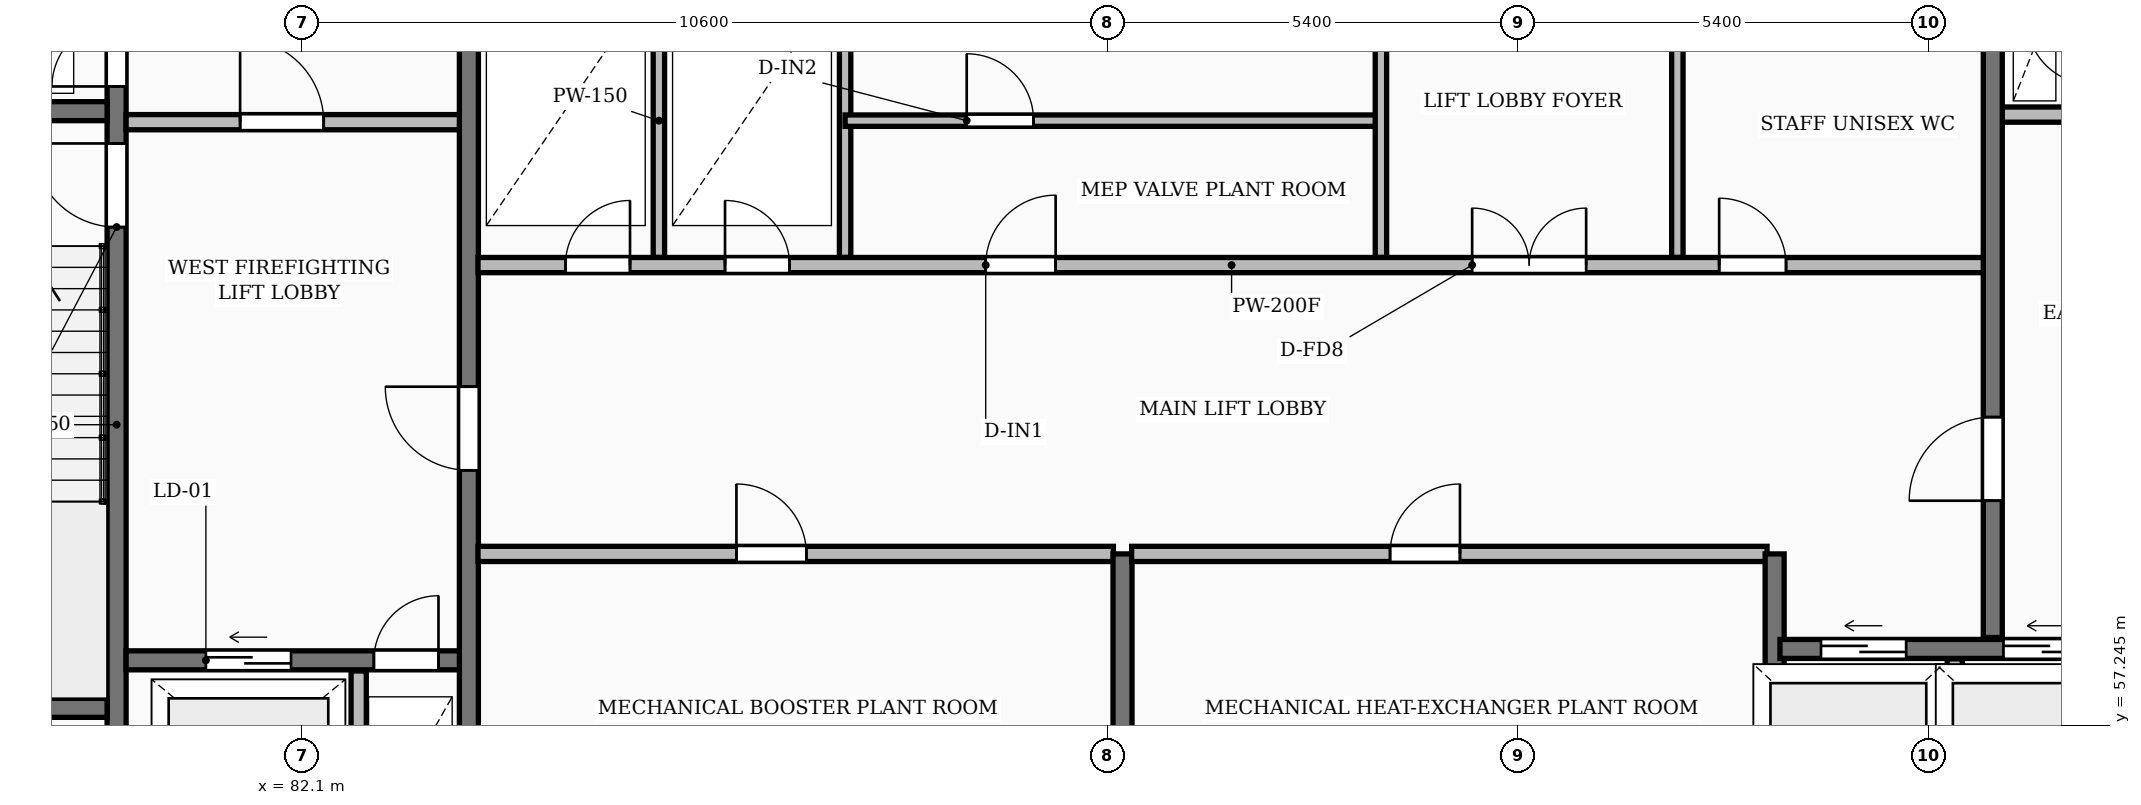
"""IFC4 building model, lengths in metres.
Left out: names, types, materials, properties, quantities, classifications, styles, units other than length and angle.
Written with IfcOpenShell. Run it as: python <this file> out.ifc"""

import sys

from ifc_helpers import new_model, si_unit, direction, frame, frame_2d, origin, place, context, subcontext, project, spatial, rectangle, extrude, element, fill, save


model = new_model("IFC4")
c1 = context("Model", 3, precision=1e-05, world=origin(), true_north=direction((0.0, 1.0)))
c2 = subcontext(c1, "Body", "Model", "MODEL_VIEW")
j1 = project(units=[si_unit("LENGTHUNIT", "METRE"), si_unit("PLANEANGLEUNIT", "RADIAN")], contexts=[c1])
p1 = place(None, origin())
s1 = spatial("IfcSite", under=j1, at=p1, CompositionType="ELEMENT")
p2 = place(p1, origin())
s2 = spatial("IfcBuilding", under=s1, at=p2, CompositionType="ELEMENT")
p3 = place(p2, frame((0.0, 0.0, 223.85)))
s3 = spatial("IfcBuildingStorey", under=s2, at=p3, CompositionType="ELEMENT", Elevation=223.85)
p4 = place(p3, frame((79.665, 55.4, 0.0), z_axis=(0.0, 0.0, 1.0), x_axis=(0.0, 1.0, 0.0)))
e1 = element("IfcWall", 1, at=p4, inside=s3, PredefinedType="SHEAR", context=c2, shape_type="SweptSolid", body=[
    extrude(rectangle(XDim=11.6, YDim=0.25, at=frame_2d((5.8, 0.0))), origin(), (0.0, 0.0, 1.0), 4.8),
])
p5 = place(p4, frame((0.55, 0.0, 0.0)))
e2 = element("IfcOpeningElement", 2, at=p5, cuts=e1, PredefinedType="OPENING", context=c2, shape_type="SweptSolid", body=[
    extrude(rectangle(XDim=0.85, YDim=2.05, at=frame_2d((0.425, 1.025))), frame((0.0, 0.135, 0.0), z_axis=(0.0, -1.0, 0.0), x_axis=(1.0, 0.0, 0.0)), (0.0, 0.0, 1.0), 0.27),
])
p6 = place(p4, frame((8.4, 0.0, 0.0)))
e3 = element("IfcOpeningElement", 3, at=p6, cuts=e1, PredefinedType="OPENING", context=c2, shape_type="SweptSolid", body=[
    extrude(rectangle(XDim=1.1, YDim=2.1, at=frame_2d((0.55, 1.05))), frame((0.0, 0.135, 0.0), z_axis=(0.0, -1.0, 0.0), x_axis=(1.0, 0.0, 0.0)), (0.0, 0.0, 1.0), 0.27),
])
p7 = place(p4, frame((10.25, 0.0, 0.0)))
e4 = element("IfcOpeningElement", 4, at=p7, cuts=e1, PredefinedType="OPENING", context=c2, shape_type="SweptSolid", body=[
    extrude(rectangle(XDim=0.85, YDim=2.05, at=frame_2d((0.425, 1.025))), frame((0.0, 0.135, 0.0), z_axis=(0.0, -1.0, 0.0), x_axis=(1.0, 0.0, 0.0)), (0.0, 0.0, 1.0), 0.27),
])
for number, where, z_axis, x_axis in (
    (5, (76.3, 57.475, 0.0), (0.0, 0.0, 1.0), (1.0, 0.0, 0.0)),
    (6, (76.3, 65.325, 0.0), (0.0, 0.0, 1.0), (1.0, 0.0, 0.0)),
):
    element("IfcWall", number, at=place(p3, frame(where, z_axis=z_axis, x_axis=x_axis)), inside=s3, PredefinedType="SHEAR", context=c2, shape_type="SweptSolid", body=[
        extrude(rectangle(XDim=3.24, YDim=0.25, at=frame_2d((1.62, 0.0))), origin(), (0.0, 0.0, 1.0), 4.8),
    ])
p8 = place(p3, frame((79.79, 58.1, 0.0), z_axis=(0.0, 0.0, 1.0), x_axis=(1.0, 0.0, 0.0)))
e7 = element("IfcWall", 7, at=p8, inside=s3, PredefinedType="SHEAR", context=c2, shape_type="SweptSolid", body=[
    extrude(rectangle(XDim=4.39, YDim=0.25, at=frame_2d((2.195, 0.0))), origin(), (0.0, 0.0, 1.0), 4.8),
])
p9 = place(p8, frame((1.05, 0.0, 0.0)))
e8 = element("IfcOpeningElement", 8, at=p9, cuts=e7, PredefinedType="OPENING", context=c2, shape_type="SweptSolid", body=[
    extrude(rectangle(XDim=1.12, YDim=2.12, at=frame_2d((0.56, 1.06))), frame((0.0, 0.135, 0.0), z_axis=(0.0, -1.0, 0.0), x_axis=(1.0, 0.0, 0.0)), (0.0, 0.0, 1.0), 0.27),
])
p10 = place(p8, frame((3.26, 0.0, 0.0)))
e9 = element("IfcOpeningElement", 9, at=p10, cuts=e7, PredefinedType="OPENING", context=c2, shape_type="SweptSolid", body=[
    extrude(rectangle(XDim=0.85, YDim=2.05, at=frame_2d((0.425, 1.025))), frame((0.0, 0.135, 0.0), z_axis=(0.0, -1.0, 0.0), x_axis=(1.0, 0.0, 0.0)), (0.0, 0.0, 1.0), 0.27),
])
p11 = place(p3, frame((82.85, 55.4, 0.0), z_axis=(0.0, 0.0, 1.0), x_axis=(0.0, 1.0, 0.0)))
e10 = element("IfcWall", 10, at=p11, inside=s3, PredefinedType="PARTITIONING", context=c2, shape_type="SweptSolid", body=[
    extrude(rectangle(XDim=2.56, YDim=0.2, at=frame_2d((1.28, 0.0))), origin(), (0.0, 0.0, 1.0), 4.48),
])
p12 = place(p3, frame((79.79, 65.18, 0.0), z_axis=(0.0, 0.0, 1.0), x_axis=(1.0, 0.0, 0.0)))
e11 = element("IfcWall", 11, at=p12, inside=s3, PredefinedType="PARTITIONING", context=c2, shape_type="SweptSolid", body=[
    extrude(rectangle(XDim=4.39, YDim=0.2, at=frame_2d((2.195, 0.0))), origin(), (0.0, 0.0, 1.0), 4.48),
])
p13 = place(p12, frame((1.5, 0.0, 0.0)))
e12 = element("IfcOpeningElement", 12, at=p13, cuts=e11, PredefinedType="OPENING", context=c2, shape_type="SweptSolid", body=[
    extrude(rectangle(XDim=1.1, YDim=2.1, at=frame_2d((0.55, 1.05))), frame((0.0, 0.11, 0.0), z_axis=(0.0, -1.0, 0.0), x_axis=(1.0, 0.0, 0.0)), (0.0, 0.0, 1.0), 0.22),
])
p14 = place(p3, frame((84.3, 55.4, 0.0), z_axis=(0.0, 0.0, 1.0), x_axis=(0.0, 1.0, 0.0)))
e13 = element("IfcWall", 13, at=p14, inside=s3, PredefinedType="SHEAR", context=c2, shape_type="SweptSolid", body=[
    extrude(rectangle(XDim=11.6, YDim=0.25, at=frame_2d((5.8, 0.0))), origin(), (0.0, 0.0, 1.0), 4.8),
])
p15 = place(p14, frame((5.2, 0.0, 0.0)))
e14 = element("IfcOpeningElement", 14, at=p15, cuts=e13, PredefinedType="OPENING", context=c2, shape_type="SweptSolid", body=[
    extrude(rectangle(XDim=1.1, YDim=2.1, at=frame_2d((0.55, 1.05))), frame((0.0, 0.135, 0.0), z_axis=(0.0, -1.0, 0.0), x_axis=(1.0, 0.0, 0.0)), (0.0, 0.0, 1.0), 0.27),
])
p16 = place(p3, frame((84.42, 59.5, 0.0), z_axis=(0.0, 0.0, 1.0), x_axis=(1.0, 0.0, 0.0)))
e15 = element("IfcWall", 15, at=p16, inside=s3, PredefinedType="PARTITIONING", context=c2, shape_type="SweptSolid", body=[
    extrude(rectangle(XDim=8.36, YDim=0.2, at=frame_2d((4.18, 0.0))), origin(), (0.0, 0.0, 1.0), 4.48),
])
p17 = place(p16, frame((3.4, 0.0, 0.0)))
e16 = element("IfcOpeningElement", 16, at=p17, cuts=e15, PredefinedType="OPENING", context=c2, shape_type="SweptSolid", body=[
    extrude(rectangle(XDim=0.92, YDim=2.08, at=frame_2d((0.46, 1.04))), frame((0.0, 0.11, 0.0), z_axis=(0.0, -1.0, 0.0), x_axis=(1.0, 0.0, 0.0)), (0.0, 0.0, 1.0), 0.22),
])
p18 = place(p3, frame((92.9, 55.4, 0.0), z_axis=(0.0, 0.0, 1.0), x_axis=(0.0, 1.0, 0.0)))
e17 = element("IfcWall", 17, at=p18, inside=s3, PredefinedType="SHEAR", context=c2, shape_type="SweptSolid", body=[
    extrude(rectangle(XDim=4.1, YDim=0.25, at=frame_2d((2.05, 0.0))), origin(), (0.0, 0.0, 1.0), 4.8),
])
p19 = place(p3, frame((93.02, 59.5, 0.0), z_axis=(0.0, 0.0, 1.0), x_axis=(1.0, 0.0, 0.0)))
e18 = element("IfcWall", 18, at=p19, inside=s3, PredefinedType="PARTITIONING", context=c2, shape_type="SweptSolid", body=[
    extrude(rectangle(XDim=8.36, YDim=0.2, at=frame_2d((4.18, 0.0))), origin(), (0.0, 0.0, 1.0), 4.48),
])
p20 = place(p19, frame((3.4, 0.0, 0.0)))
e19 = element("IfcOpeningElement", 19, at=p20, cuts=e18, PredefinedType="OPENING", context=c2, shape_type="SweptSolid", body=[
    extrude(rectangle(XDim=0.92, YDim=2.08, at=frame_2d((0.46, 1.04))), frame((0.0, 0.11, 0.0), z_axis=(0.0, -1.0, 0.0), x_axis=(1.0, 0.0, 0.0)), (0.0, 0.0, 1.0), 0.22),
])
p21 = place(p3, frame((101.48, 55.4, 0.0), z_axis=(0.0, 0.0, 1.0), x_axis=(0.0, 1.0, 0.0)))
e20 = element("IfcWall", 20, at=p21, inside=s3, PredefinedType="SHEAR", context=c2, shape_type="SweptSolid", body=[
    extrude(rectangle(XDim=4.1, YDim=0.25, at=frame_2d((2.05, 0.0))), origin(), (0.0, 0.0, 1.0), 4.8),
])
p22 = place(p3, frame((103.85, 55.4, 0.0), z_axis=(0.0, 0.0, 1.0), x_axis=(0.0, 1.0, 0.0)))
e21 = element("IfcWall", 21, at=p22, inside=s3, PredefinedType="PARTITIONING", context=c2, shape_type="SweptSolid", body=[
    extrude(rectangle(XDim=2.72, YDim=0.2, at=frame_2d((1.36, 0.0))), origin(), (0.0, 0.0, 1.0), 4.48),
])
p23 = place(p3, frame((101.55, 58.25, 0.0), z_axis=(0.0, 0.0, 1.0), x_axis=(1.0, 0.0, 0.0)))
e22 = element("IfcWall", 22, at=p23, inside=s3, PredefinedType="SHEAR", context=c2, shape_type="SweptSolid", body=[
    extrude(rectangle(XDim=4.6, YDim=0.25, at=frame_2d((2.3, 0.0))), origin(), (0.0, 0.0, 1.0), 4.8),
])
p24 = place(p23, frame((0.54, 0.0, 0.0)))
e23 = element("IfcOpeningElement", 23, at=p24, cuts=e22, PredefinedType="OPENING", context=c2, shape_type="SweptSolid", body=[
    extrude(rectangle(XDim=1.12, YDim=2.12, at=frame_2d((0.56, 1.06))), frame((0.0, 0.135, 0.0), z_axis=(0.0, -1.0, 0.0), x_axis=(1.0, 0.0, 0.0)), (0.0, 0.0, 1.0), 0.27),
])
p25 = place(p23, frame((2.94, 0.0, 0.0)))
e24 = element("IfcOpeningElement", 24, at=p25, cuts=e22, PredefinedType="OPENING", context=c2, shape_type="SweptSolid", body=[
    extrude(rectangle(XDim=1.12, YDim=2.12, at=frame_2d((0.56, 1.06))), frame((0.0, 0.135, 0.0), z_axis=(0.0, -1.0, 0.0), x_axis=(1.0, 0.0, 0.0)), (0.0, 0.0, 1.0), 0.27),
])
for number, where, z_axis, x_axis in (
    (25, (86.8, 63.4, 0.0), (0.0, 0.0, 1.0), (0.0, 1.0, 0.0)),
    (26, (89.25, 63.4, 0.0), (0.0, 0.0, 1.0), (0.0, 1.0, 0.0)),
):
    element("IfcWall", number, at=place(p3, frame(where, z_axis=z_axis, x_axis=x_axis)), inside=s3, PredefinedType="PARTITIONING", context=c2, shape_type="SweptSolid", body=[
        extrude(rectangle(XDim=3.6, YDim=0.15, at=frame_2d((1.8, 0.0))), origin(), (0.0, 0.0, 1.0), 4.48),
    ])
p26 = place(p3, frame((89.25, 65.2, 0.0), z_axis=(0.0, 0.0, 1.0), x_axis=(1.0, 0.0, 0.0)))
e27 = element("IfcWall", 27, at=p26, inside=s3, PredefinedType="PARTITIONING", context=c2, shape_type="SweptSolid", body=[
    extrude(rectangle(XDim=7.05, YDim=0.15, at=frame_2d((3.525, 0.0))), origin(), (0.0, 0.0, 1.0), 4.48),
])
p27 = place(p26, frame((1.6, 0.0, 0.0)))
e28 = element("IfcOpeningElement", 28, at=p27, cuts=e27, PredefinedType="OPENING", context=c2, shape_type="SweptSolid", body=[
    extrude(rectangle(XDim=0.88, YDim=2.06, at=frame_2d((0.44, 1.03))), frame((0.0, 0.085, 0.0), z_axis=(0.0, -1.0, 0.0), x_axis=(1.0, 0.0, 0.0)), (0.0, 0.0, 1.0), 0.17),
])
for number, where, z_axis, x_axis in (
    (29, (96.3, 63.4, 0.0), (0.0, 0.0, 1.0), (0.0, 1.0, 0.0)),
    (30, (100.2, 63.4, 0.0), (0.0, 0.0, 1.0), (0.0, 1.0, 0.0)),
):
    element("IfcWall", number, at=place(p3, frame(where, z_axis=z_axis, x_axis=x_axis)), inside=s3, PredefinedType="PARTITIONING", context=c2, shape_type="SweptSolid", body=[
        extrude(rectangle(XDim=3.6, YDim=0.15, at=frame_2d((1.8, 0.0))), origin(), (0.0, 0.0, 1.0), 4.48),
    ])
p28 = place(p3, frame((84.42, 63.3, 0.0), z_axis=(0.0, 0.0, 1.0), x_axis=(1.0, 0.0, 0.0)))
e31 = element("IfcWall", 31, at=p28, inside=s3, PredefinedType="PARTITIONING", context=c2, shape_type="SweptSolid", body=[
    extrude(rectangle(XDim=19.83, YDim=0.2, at=frame_2d((9.915, 0.0))), origin(), (0.0, 0.0, 1.0), 4.48),
])
p29 = place(p28, frame((1.15, 0.0, 0.0)))
e32 = element("IfcOpeningElement", 32, at=p29, cuts=e31, PredefinedType="OPENING", context=c2, shape_type="SweptSolid", body=[
    extrude(rectangle(XDim=0.85, YDim=2.05, at=frame_2d((0.425, 1.025))), frame((0.0, 0.11, 0.0), z_axis=(0.0, -1.0, 0.0), x_axis=(1.0, 0.0, 0.0)), (0.0, 0.0, 1.0), 0.22),
])
p30 = place(p28, frame((3.25, 0.0, 0.0)))
e33 = element("IfcOpeningElement", 33, at=p30, cuts=e31, PredefinedType="OPENING", context=c2, shape_type="SweptSolid", body=[
    extrude(rectangle(XDim=0.85, YDim=2.05, at=frame_2d((0.425, 1.025))), frame((0.0, 0.11, 0.0), z_axis=(0.0, -1.0, 0.0), x_axis=(1.0, 0.0, 0.0)), (0.0, 0.0, 1.0), 0.22),
])
p31 = place(p28, frame((13.08, 0.0, 0.0)))
e34 = element("IfcOpeningElement", 34, at=p31, cuts=e31, PredefinedType="OPENING", context=c2, shape_type="SweptSolid", body=[
    extrude(rectangle(XDim=1.5, YDim=2.2, at=frame_2d((0.75, 1.1))), frame((0.0, 0.11, 0.0), z_axis=(0.0, -1.0, 0.0), x_axis=(1.0, 0.0, 0.0)), (0.0, 0.0, 1.0), 0.22),
])
p32 = place(p28, frame((6.68, 0.0, 0.0)))
e35 = element("IfcOpeningElement", 35, at=p32, cuts=e31, PredefinedType="OPENING", context=c2, shape_type="SweptSolid", body=[
    extrude(rectangle(XDim=0.92, YDim=2.08, at=frame_2d((0.46, 1.04))), frame((0.0, 0.11, 0.0), z_axis=(0.0, -1.0, 0.0), x_axis=(1.0, 0.0, 0.0)), (0.0, 0.0, 1.0), 0.22),
])
p33 = place(p28, frame((16.33, 0.0, 0.0)))
e36 = element("IfcOpeningElement", 36, at=p33, cuts=e31, PredefinedType="OPENING", context=c2, shape_type="SweptSolid", body=[
    extrude(rectangle(XDim=0.88, YDim=2.06, at=frame_2d((0.44, 1.03))), frame((0.0, 0.11, 0.0), z_axis=(0.0, -1.0, 0.0), x_axis=(1.0, 0.0, 0.0)), (0.0, 0.0, 1.0), 0.22),
])
p34 = place(p3, frame((104.45, 65.28, 0.0), z_axis=(0.0, 0.0, 1.0), x_axis=(1.0, 0.0, 0.0)))
e37 = element("IfcWall", 37, at=p34, inside=s3, PredefinedType="PARTITIONING", context=c2, shape_type="SweptSolid", body=[
    extrude(rectangle(XDim=1.2, YDim=0.2, at=frame_2d((0.6, 0.0))), origin(), (0.0, 0.0, 1.0), 4.48),
])
p35 = place(p3, frame((104.35, 58.4, 0.0), z_axis=(0.0, 0.0, 1.0), x_axis=(0.0, 1.0, 0.0)))
e38 = element("IfcWall", 38, at=p35, inside=s3, PredefinedType="SHEAR", context=c2, shape_type="SweptSolid", body=[
    extrude(rectangle(XDim=8.6, YDim=0.25, at=frame_2d((4.3, 0.0))), origin(), (0.0, 0.0, 1.0), 4.8),
])
p36 = place(p35, frame((1.8, 0.0, 0.0)))
e39 = element("IfcOpeningElement", 39, at=p36, cuts=e38, PredefinedType="OPENING", context=c2, shape_type="SweptSolid", body=[
    extrude(rectangle(XDim=1.1, YDim=2.1, at=frame_2d((0.55, 1.05))), frame((0.0, 0.135, 0.0), z_axis=(0.0, -1.0, 0.0), x_axis=(1.0, 0.0, 0.0)), (0.0, 0.0, 1.0), 0.27),
])
p37 = place(p6, origin())
e40 = element("IfcDoor", 40, at=p37, inside=s3, OperationType="SINGLE_SWING_RIGHT", PredefinedType="DOOR", context=c2, shape_type="SweptSolid", body=[
    extrude(rectangle(XDim=1.1, YDim=2.1, at=frame_2d((0.55, 1.05))), frame((0.0, 0.025, 0.0), z_axis=(0.0, -1.0, 0.0), x_axis=(1.0, 0.0, 0.0)), (0.0, 0.0, 1.0), 0.05),
])
fill(e3, e40)
p38 = place(p7, origin())
e41 = element("IfcDoor", 41, at=p38, inside=s3, OperationType="SINGLE_SWING_LEFT", PredefinedType="DOOR", context=c2, shape_type="SweptSolid", body=[
    extrude(rectangle(XDim=0.85, YDim=2.05, at=frame_2d((0.425, 1.025))), frame((0.0, 0.025, 0.0), z_axis=(0.0, -1.0, 0.0), x_axis=(1.0, 0.0, 0.0)), (0.0, 0.0, 1.0), 0.05),
])
fill(e4, e41)
p39 = place(p9, origin())
e42 = element("IfcDoor", 42, at=p39, inside=s3, OperationType="SLIDING_TO_LEFT", PredefinedType="DOOR", context=c2, shape_type="SweptSolid", body=[
    extrude(rectangle(XDim=1.12, YDim=2.12, at=frame_2d((0.56, 1.06))), frame((0.0, 0.025, 0.0), z_axis=(0.0, -1.0, 0.0), x_axis=(1.0, 0.0, 0.0)), (0.0, 0.0, 1.0), 0.05),
])
fill(e8, e42)
p40 = place(p10, origin())
e43 = element("IfcDoor", 43, at=p40, inside=s3, OperationType="SINGLE_SWING_RIGHT", PredefinedType="DOOR", context=c2, shape_type="SweptSolid", body=[
    extrude(rectangle(XDim=0.85, YDim=2.05, at=frame_2d((0.425, 1.025))), frame((0.0, 0.025, 0.0), z_axis=(0.0, -1.0, 0.0), x_axis=(1.0, 0.0, 0.0)), (0.0, 0.0, 1.0), 0.05),
])
fill(e9, e43)
p41 = place(p13, origin())
e44 = element("IfcDoor", 44, at=p41, inside=s3, OperationType="SINGLE_SWING_LEFT", PredefinedType="DOOR", context=c2, shape_type="SweptSolid", body=[
    extrude(rectangle(XDim=1.1, YDim=2.1, at=frame_2d((0.55, 1.05))), frame((0.0, 0.025, 0.0), z_axis=(0.0, -1.0, 0.0), x_axis=(1.0, 0.0, 0.0)), (0.0, 0.0, 1.0), 0.05),
])
fill(e12, e44)
p42 = place(p15, origin())
e45 = element("IfcDoor", 45, at=p42, inside=s3, OperationType="SINGLE_SWING_RIGHT", PredefinedType="DOOR", context=c2, shape_type="SweptSolid", body=[
    extrude(rectangle(XDim=1.1, YDim=2.1, at=frame_2d((0.55, 1.05))), frame((0.0, 0.025, 0.0), z_axis=(0.0, -1.0, 0.0), x_axis=(1.0, 0.0, 0.0)), (0.0, 0.0, 1.0), 0.05),
])
fill(e14, e45)
p43 = place(p17, origin())
e46 = element("IfcDoor", 46, at=p43, inside=s3, OperationType="SINGLE_SWING_LEFT", PredefinedType="DOOR", context=c2, shape_type="SweptSolid", body=[
    extrude(rectangle(XDim=0.92, YDim=2.08, at=frame_2d((0.46, 1.04))), frame((0.0, 0.025, 0.0), z_axis=(0.0, -1.0, 0.0), x_axis=(1.0, 0.0, 0.0)), (0.0, 0.0, 1.0), 0.05),
])
fill(e16, e46)
p44 = place(p20, origin())
e47 = element("IfcDoor", 47, at=p44, inside=s3, OperationType="SINGLE_SWING_RIGHT", PredefinedType="DOOR", context=c2, shape_type="SweptSolid", body=[
    extrude(rectangle(XDim=0.92, YDim=2.08, at=frame_2d((0.46, 1.04))), frame((0.0, 0.025, 0.0), z_axis=(0.0, -1.0, 0.0), x_axis=(1.0, 0.0, 0.0)), (0.0, 0.0, 1.0), 0.05),
])
fill(e19, e47)
p45 = place(p24, origin())
e48 = element("IfcDoor", 48, at=p45, inside=s3, OperationType="SLIDING_TO_LEFT", PredefinedType="DOOR", context=c2, shape_type="SweptSolid", body=[
    extrude(rectangle(XDim=1.12, YDim=2.12, at=frame_2d((0.56, 1.06))), frame((0.0, 0.025, 0.0), z_axis=(0.0, -1.0, 0.0), x_axis=(1.0, 0.0, 0.0)), (0.0, 0.0, 1.0), 0.05),
])
fill(e23, e48)
p46 = place(p25, origin())
e49 = element("IfcDoor", 49, at=p46, inside=s3, OperationType="SLIDING_TO_LEFT", PredefinedType="DOOR", context=c2, shape_type="SweptSolid", body=[
    extrude(rectangle(XDim=1.12, YDim=2.12, at=frame_2d((0.56, 1.06))), frame((0.0, 0.025, 0.0), z_axis=(0.0, -1.0, 0.0), x_axis=(1.0, 0.0, 0.0)), (0.0, 0.0, 1.0), 0.05),
])
fill(e24, e49)
p47 = place(p27, origin())
e50 = element("IfcDoor", 50, at=p47, inside=s3, OperationType="SINGLE_SWING_LEFT", PredefinedType="DOOR", context=c2, shape_type="SweptSolid", body=[
    extrude(rectangle(XDim=0.88, YDim=2.06, at=frame_2d((0.44, 1.03))), frame((0.0, 0.025, 0.0), z_axis=(0.0, -1.0, 0.0), x_axis=(1.0, 0.0, 0.0)), (0.0, 0.0, 1.0), 0.05),
])
fill(e28, e50)
p48 = place(p29, origin())
e51 = element("IfcDoor", 51, at=p48, inside=s3, OperationType="SINGLE_SWING_RIGHT", PredefinedType="DOOR", context=c2, shape_type="SweptSolid", body=[
    extrude(rectangle(XDim=0.85, YDim=2.05, at=frame_2d((0.425, 1.025))), frame((0.0, 0.025, 0.0), z_axis=(0.0, -1.0, 0.0), x_axis=(1.0, 0.0, 0.0)), (0.0, 0.0, 1.0), 0.05),
])
fill(e32, e51)
p49 = place(p30, origin())
e52 = element("IfcDoor", 52, at=p49, inside=s3, OperationType="SINGLE_SWING_LEFT", PredefinedType="DOOR", context=c2, shape_type="SweptSolid", body=[
    extrude(rectangle(XDim=0.85, YDim=2.05, at=frame_2d((0.425, 1.025))), frame((0.0, 0.025, 0.0), z_axis=(0.0, -1.0, 0.0), x_axis=(1.0, 0.0, 0.0)), (0.0, 0.0, 1.0), 0.05),
])
fill(e33, e52)
p50 = place(p31, origin())
e53 = element("IfcDoor", 53, at=p50, inside=s3, OperationType="DOUBLE_DOOR_SINGLE_SWING", PredefinedType="DOOR", context=c2, shape_type="SweptSolid", body=[
    extrude(rectangle(XDim=1.5, YDim=2.2, at=frame_2d((0.75, 1.1))), frame((0.0, 0.025, 0.0), z_axis=(0.0, -1.0, 0.0), x_axis=(1.0, 0.0, 0.0)), (0.0, 0.0, 1.0), 0.05),
])
fill(e34, e53)
p51 = place(p32, origin())
e54 = element("IfcDoor", 54, at=p51, inside=s3, OperationType="SINGLE_SWING_RIGHT", PredefinedType="DOOR", context=c2, shape_type="SweptSolid", body=[
    extrude(rectangle(XDim=0.92, YDim=2.08, at=frame_2d((0.46, 1.04))), frame((0.0, 0.025, 0.0), z_axis=(0.0, -1.0, 0.0), x_axis=(1.0, 0.0, 0.0)), (0.0, 0.0, 1.0), 0.05),
])
fill(e35, e54)
p52 = place(p33, origin())
e55 = element("IfcDoor", 55, at=p52, inside=s3, OperationType="SINGLE_SWING_LEFT", PredefinedType="DOOR", context=c2, shape_type="SweptSolid", body=[
    extrude(rectangle(XDim=0.88, YDim=2.06, at=frame_2d((0.44, 1.03))), frame((0.0, 0.025, 0.0), z_axis=(0.0, -1.0, 0.0), x_axis=(1.0, 0.0, 0.0)), (0.0, 0.0, 1.0), 0.05),
])
fill(e36, e55)
p53 = place(p36, origin())
e56 = element("IfcDoor", 56, at=p53, inside=s3, OperationType="SINGLE_SWING_LEFT", PredefinedType="DOOR", context=c2, shape_type="SweptSolid", body=[
    extrude(rectangle(XDim=1.1, YDim=2.1, at=frame_2d((0.55, 1.05))), frame((0.0, 0.025, 0.0), z_axis=(0.0, -1.0, 0.0), x_axis=(1.0, 0.0, 0.0)), (0.0, 0.0, 1.0), 0.05),
])
fill(e39, e56)
save(model, sys.argv[1])
